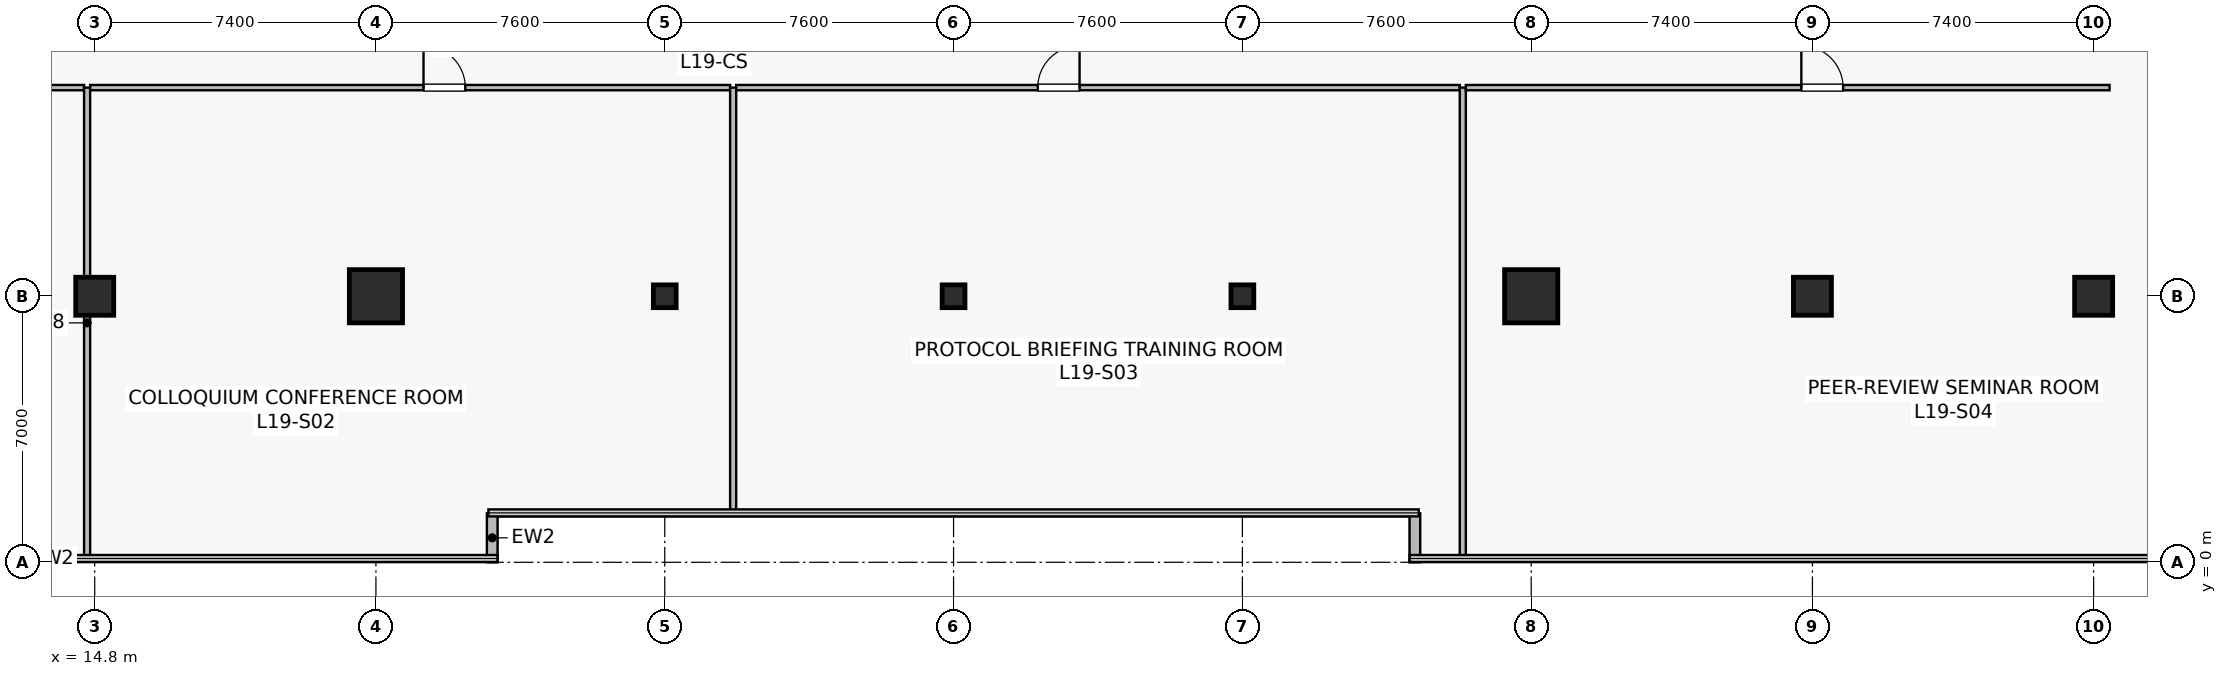
"""IFC4 building model, lengths in metres.
Left out: names, types, materials, properties, quantities, classifications, styles, units other than length and angle.
Written with IfcOpenShell. Run it as: python <this file> out.ifc"""

import sys

from ifc_helpers import new_model, si_unit, direction, frame, frame_2d, origin, origin_2d, place, context, subcontext, project, spatial, rectangle, hollow_rectangle, extrude, source, transform, mapped, element, fill, save


model = new_model("IFC4")
c1 = context("Model", 3, precision=1e-05, world=origin(), true_north=direction((0.0, 1.0)))
c2 = subcontext(c1, "Body", "Model", "MODEL_VIEW")
j1 = project(units=[si_unit("LENGTHUNIT", "METRE"), si_unit("PLANEANGLEUNIT", "RADIAN")], contexts=[c1])
p1 = place(None, origin())
s1 = spatial("IfcSite", under=j1, at=p1, CompositionType="ELEMENT")
p2 = place(p1, origin())
s2 = spatial("IfcBuilding", under=s1, at=p2, CompositionType="ELEMENT")
p3 = place(p2, frame((0.0, 0.0, 78.5)))
s3 = spatial("IfcBuildingStorey", under=s2, at=p3, CompositionType="ELEMENT", Elevation=78.5)
m1 = source(origin(), c2, "Body", "SweptSolid", [
    extrude(rectangle(XDim=1.0, YDim=1.0, at=origin_2d()), origin(), (0.0, 0.0, 1.0), 4.1),
])
p4 = place(p3, frame((14.8, 7.0, 0.0), z_axis=(0.0, 0.0, 1.0), x_axis=(1.0, 0.0, 0.0)))
e1 = element("IfcColumn", 1, at=p4, inside=s3, PredefinedType="COLUMN", context=c2, shape_type="MappedRepresentation", body=[
    mapped(m1, transform((0.0, 0.0, 0.0), scale=1.0)),
])
m2 = source(origin(), c2, "Body", "SweptSolid", [
    extrude(rectangle(XDim=1.4, YDim=1.4, at=origin_2d()), origin(), (0.0, 0.0, 1.0), 4.1),
])
for number, where, z_axis, x_axis in (
    (2, (22.2, 7.0, 0.0), (0.0, 0.0, 1.0), (1.0, 0.0, 0.0)),
    (3, (52.6, 7.0, 0.0), (0.0, 0.0, 1.0), (1.0, 0.0, 0.0)),
):
    element("IfcColumn", number, at=place(p3, frame(where, z_axis=z_axis, x_axis=x_axis)), inside=s3, PredefinedType="COLUMN", context=c2, shape_type="MappedRepresentation", body=[
        mapped(m2, transform((0.0, 0.0, 0.0), scale=1.0)),
    ])
for number, where, z_axis, x_axis in (
    (4, (60.0, 7.0, 0.0), (0.0, 0.0, 1.0), (1.0, 0.0, 0.0)),
    (5, (67.4, 7.0, 0.0), (0.0, 0.0, 1.0), (1.0, 0.0, 0.0)),
):
    element("IfcColumn", number, at=place(p3, frame(where, z_axis=z_axis, x_axis=x_axis)), inside=s3, PredefinedType="COLUMN", context=c2, shape_type="MappedRepresentation", body=[
        mapped(m1, transform((0.0, 0.0, 0.0), scale=1.0)),
    ])
m3 = source(origin(), c2, "Body", "SweptSolid", [
    extrude(hollow_rectangle(XDim=0.6, YDim=0.6, WallThickness=0.028, at=origin_2d()), origin(), (0.0, 0.0, 1.0), 4.1),
])
for number, where, z_axis, x_axis in (
    (6, (29.8, 7.0, 0.0), (0.0, 0.0, 1.0), (1.0, 0.0, 0.0)),
    (7, (37.4, 7.0, 0.0), (0.0, 0.0, 1.0), (1.0, 0.0, 0.0)),
    (8, (45.0, 7.0, 0.0), (0.0, 0.0, 1.0), (1.0, 0.0, 0.0)),
):
    element("IfcColumn", number, at=place(p3, frame(where, z_axis=z_axis, x_axis=x_axis)), inside=s3, PredefinedType="COLUMN", context=c2, shape_type="MappedRepresentation", body=[
        mapped(m3, transform((0.0, 0.0, 0.0), scale=1.0)),
    ])
for number, where, z_axis, x_axis in (
    (9, (25.26, 0.0, 0.0), (0.0, 0.0, 1.0), (0.0, 1.0, 0.0)),
    (10, (49.54, 1.288, 0.0), (0.0, 0.0, 1.0), (0.0, -1.0, 0.0)),
):
    element("IfcWall", number, at=place(p3, frame(where, z_axis=z_axis, x_axis=x_axis)), inside=s3, PredefinedType="STANDARD", context=c2, shape_type="SweptSolid", body=[
        extrude(rectangle(XDim=1.288, YDim=0.28, at=frame_2d((0.644, 0.0))), origin(), (0.0, 0.0, 1.0), 3.78),
    ])
p5 = place(p3, frame((6.98, 12.49, 0.0), z_axis=(0.0, 0.0, 1.0), x_axis=(1.0, 0.0, 0.0)))
e11 = element("IfcWall", 11, at=p5, inside=s3, PredefinedType="PARTITIONING", context=c2, shape_type="SweptSolid", body=[
    extrude(rectangle(XDim=7.54, YDim=0.14, at=frame_2d((3.77, 0.0))), origin(), (0.0, 0.0, 1.0), 3.265),
])
p6 = place(p5, frame((2.92, 0.0, 0.0)))
e12 = element("IfcOpeningElement", 12, at=p6, cuts=e11, PredefinedType="OPENING", context=c2, shape_type="SweptSolid", body=[
    extrude(rectangle(XDim=1.0, YDim=2.15, at=frame_2d((0.5, 1.075))), frame((0.0, 0.08, 0.0), z_axis=(0.0, -1.0, 0.0), x_axis=(1.0, 0.0, 0.0)), (0.0, 0.0, 1.0), 0.16),
])
p7 = place(p3, frame((14.6, 0.11, 0.0), z_axis=(0.0, 0.0, 1.0), x_axis=(0.0, 1.0, 0.0)))
e13 = element("IfcWall", 13, at=p7, inside=s3, PredefinedType="PARTITIONING", context=c2, shape_type="SweptSolid", body=[
    extrude(rectangle(XDim=12.38, YDim=0.16, at=frame_2d((6.19, 0.0))), origin(), (0.0, 0.0, 1.0), 3.015),
])
p8 = place(p3, frame((14.68, 12.49, 0.0), z_axis=(0.0, 0.0, 1.0), x_axis=(1.0, 0.0, 0.0)))
e14 = element("IfcWall", 14, at=p8, inside=s3, PredefinedType="PARTITIONING", context=c2, shape_type="SweptSolid", body=[
    extrude(rectangle(XDim=16.84, YDim=0.14, at=frame_2d((8.42, 0.0))), origin(), (0.0, 0.0, 1.0), 3.115),
])
p9 = place(p8, frame((8.772, 0.0, 0.0)))
e15 = element("IfcOpeningElement", 15, at=p9, cuts=e14, PredefinedType="OPENING", context=c2, shape_type="SweptSolid", body=[
    extrude(rectangle(XDim=1.1, YDim=2.18, at=frame_2d((0.55, 1.09))), frame((0.0, 0.08, 0.0), z_axis=(0.0, -1.0, 0.0), x_axis=(1.0, 0.0, 0.0)), (0.0, 0.0, 1.0), 0.16),
])
p10 = place(p3, frame((31.6, 1.31, 0.0), z_axis=(0.0, 0.0, 1.0), x_axis=(0.0, 1.0, 0.0)))
e16 = element("IfcWall", 16, at=p10, inside=s3, PredefinedType="PARTITIONING", context=c2, shape_type="SweptSolid", body=[
    extrude(rectangle(XDim=11.18, YDim=0.16, at=frame_2d((5.59, 0.0))), origin(), (0.0, 0.0, 1.0), 3.015),
])
p11 = place(p3, frame((31.68, 12.49, 0.0), z_axis=(0.0, 0.0, 1.0), x_axis=(1.0, 0.0, 0.0)))
e17 = element("IfcWall", 17, at=p11, inside=s3, PredefinedType="PARTITIONING", context=c2, shape_type="SweptSolid", body=[
    extrude(rectangle(XDim=19.04, YDim=0.14, at=frame_2d((9.52, 0.0))), origin(), (0.0, 0.0, 1.0), 3.115),
])
p12 = place(p11, frame((7.936, 0.0, 0.0)))
e18 = element("IfcOpeningElement", 18, at=p12, cuts=e17, PredefinedType="OPENING", context=c2, shape_type="SweptSolid", body=[
    extrude(rectangle(XDim=1.1, YDim=2.18, at=frame_2d((0.55, 1.09))), frame((0.0, 0.08, 0.0), z_axis=(0.0, -1.0, 0.0), x_axis=(1.0, 0.0, 0.0)), (0.0, 0.0, 1.0), 0.16),
])
p13 = place(p3, frame((50.8, 0.11, 0.0), z_axis=(0.0, 0.0, 1.0), x_axis=(0.0, 1.0, 0.0)))
e19 = element("IfcWall", 19, at=p13, inside=s3, PredefinedType="PARTITIONING", context=c2, shape_type="SweptSolid", body=[
    extrude(rectangle(XDim=12.38, YDim=0.16, at=frame_2d((6.19, 0.0))), origin(), (0.0, 0.0, 1.0), 3.015),
])
p14 = place(p3, frame((50.88, 12.49, 0.0), z_axis=(0.0, 0.0, 1.0), x_axis=(1.0, 0.0, 0.0)))
e20 = element("IfcWall", 20, at=p14, inside=s3, PredefinedType="PARTITIONING", context=c2, shape_type="SweptSolid", body=[
    extrude(rectangle(XDim=16.94, YDim=0.14, at=frame_2d((8.47, 0.0))), origin(), (0.0, 0.0, 1.0), 3.115),
])
p15 = place(p14, frame((8.828, 0.0, 0.0)))
e21 = element("IfcOpeningElement", 21, at=p15, cuts=e20, PredefinedType="OPENING", context=c2, shape_type="SweptSolid", body=[
    extrude(rectangle(XDim=1.1, YDim=2.18, at=frame_2d((0.55, 1.09))), frame((0.0, 0.08, 0.0), z_axis=(0.0, -1.0, 0.0), x_axis=(1.0, 0.0, 0.0)), (0.0, 0.0, 1.0), 0.16),
])
m4 = source(origin(), c2, "Body", "SweptSolid", [
    extrude(rectangle(XDim=1.1, YDim=2.18, at=frame_2d((0.55, 1.09))), frame((0.0, 0.025, 0.0), z_axis=(0.0, -1.0, 0.0), x_axis=(1.0, 0.0, 0.0)), (0.0, 0.0, 1.0), 0.05),
])
p16 = place(p9, origin())
e22 = element("IfcDoor", 22, at=p16, inside=s3, OperationType="SINGLE_SWING_LEFT", PredefinedType="DOOR", context=c2, shape_type="MappedRepresentation", body=[
    mapped(m4, transform((0.0, 0.0, 0.0), scale=1.0)),
])
fill(e15, e22)
p17 = place(p12, origin())
e23 = element("IfcDoor", 23, at=p17, inside=s3, OperationType="SINGLE_SWING_RIGHT", PredefinedType="DOOR", context=c2, shape_type="MappedRepresentation", body=[
    mapped(m4, transform((0.0, 0.0, 0.0), scale=1.0)),
])
fill(e18, e23)
p18 = place(p15, origin())
e24 = element("IfcDoor", 24, at=p18, inside=s3, OperationType="SINGLE_SWING_LEFT", PredefinedType="DOOR", context=c2, shape_type="MappedRepresentation", body=[
    mapped(m4, transform((0.0, 0.0, 0.0), scale=1.0)),
])
fill(e21, e24)
save(model, sys.argv[1])
